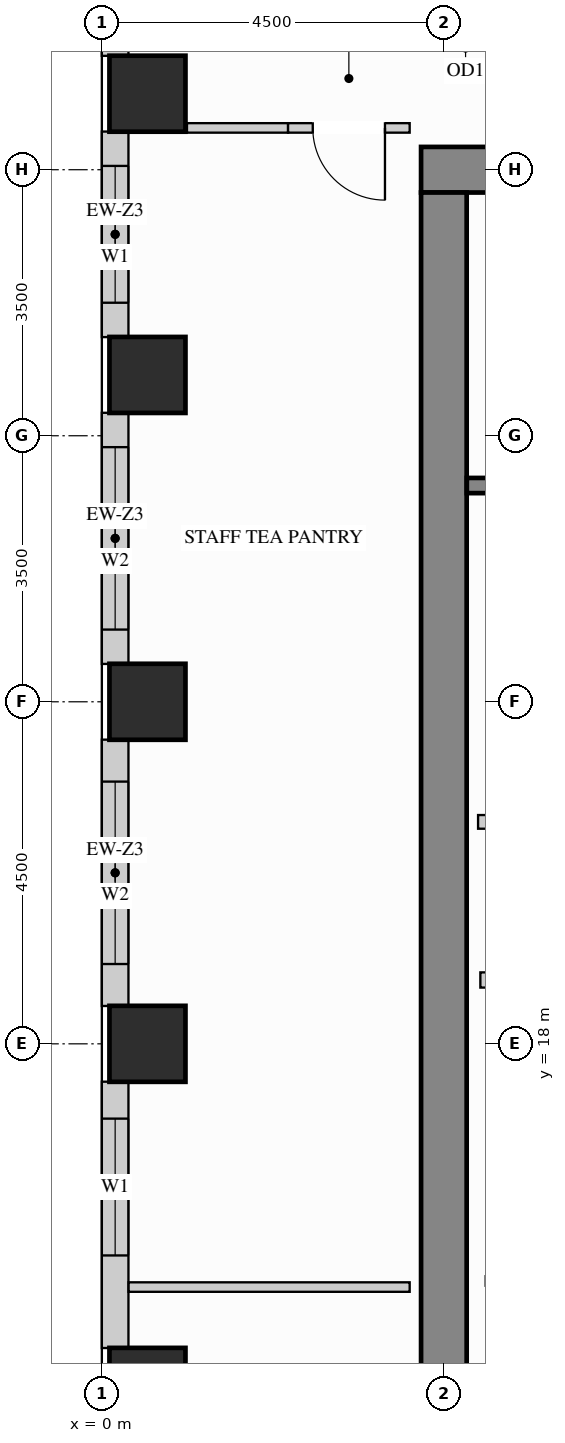
"""IFC4 building model, lengths in metres.
Left out: names, types, materials, properties, quantities, classifications, styles, units other than length and angle.
Written with IfcOpenShell. Run it as: python <this file> out.ifc"""

import sys

from ifc_helpers import new_model, si_unit, direction, frame, frame_2d, origin, origin_2d, place, context, subcontext, project, spatial, rectangle, extrude, source, transform, mapped, element, fill, save


model = new_model("IFC4")
c1 = context("Model", 3, precision=1e-05, world=origin(), true_north=direction((0.0, 1.0)))
c2 = subcontext(c1, "Body", "Model", "MODEL_VIEW")
j1 = project(units=[si_unit("LENGTHUNIT", "METRE"), si_unit("PLANEANGLEUNIT", "RADIAN")], contexts=[c1])
p1 = place(None, origin())
s1 = spatial("IfcSite", under=j1, at=p1, CompositionType="ELEMENT")
p2 = place(p1, origin())
s2 = spatial("IfcBuilding", under=s1, at=p2, CompositionType="ELEMENT")
p3 = place(p2, frame((0.0, 0.0, 200.7)))
s3 = spatial("IfcBuildingStorey", under=s2, at=p3, CompositionType="ELEMENT", Elevation=200.7)
m1 = source(origin(), c2, "Body", "SweptSolid", [
    extrude(rectangle(XDim=1.0, YDim=1.0, at=origin_2d()), origin(), (0.0, 0.0, 1.0), 3.4),
])
for number, where, z_axis, x_axis in (
    (1, (0.6, 13.5, 0.0), (0.0, 0.0, 1.0), (1.0, 0.0, 0.0)),
    (2, (0.6, 18.0, 0.0), (0.0, 0.0, 1.0), (1.0, 0.0, 0.0)),
    (3, (0.6, 22.5, 0.0), (0.0, 0.0, 1.0), (1.0, 0.0, 0.0)),
    (4, (0.6, 26.8, 0.0), (0.0, 0.0, 1.0), (1.0, 0.0, 0.0)),
    (5, (0.6, 30.5, 0.0), (0.0, 0.0, 1.0), (1.0, 0.0, 0.0)),
):
    element("IfcColumn", number, at=place(p3, frame(where, z_axis=z_axis, x_axis=x_axis)), inside=s3, PredefinedType="COLUMN", context=c2, shape_type="MappedRepresentation", body=[
        mapped(m1, transform((0.0, 0.0, 0.0), x_axis=(1.0, 0.0, 0.0), y_axis=(0.0, 1.0, 0.0), z_axis=(0.0, 0.0, 1.0))),
    ])
m2 = source(origin(), c2, "Body", "SweptSolid", [
    extrude(rectangle(XDim=10.6, YDim=0.6, at=frame_2d((5.3, 0.0))), origin(), (0.0, 0.0, 1.0), 3.4),
])
p4 = place(p3, frame((4.2, 29.5, 0.0), z_axis=(0.0, 0.0, 1.0), x_axis=(1.0, 0.0, 0.0)))
e6 = element("IfcWall", 6, at=p4, inside=s3, PredefinedType="SHEAR", context=c2, shape_type="MappedRepresentation", body=[
    mapped(m2, transform((0.0, 0.0, 0.0), x_axis=(1.0, 0.0, 0.0), y_axis=(0.0, 1.0, 0.0), z_axis=(0.0, 0.0, 1.0))),
])
m3 = source(origin(), c2, "Body", "SweptSolid", [
    extrude(rectangle(XDim=20.4, YDim=0.6, at=frame_2d((10.2, 0.0))), origin(), (0.0, 0.0, 1.0), 3.4),
])
p5 = place(p3, frame((4.5, 8.8, 0.0), z_axis=(0.0, 0.0, 1.0), x_axis=(0.0, 1.0, 0.0)))
e7 = element("IfcWall", 7, at=p5, inside=s3, PredefinedType="SHEAR", context=c2, shape_type="MappedRepresentation", body=[
    mapped(m3, transform((0.0, 0.0, 0.0), x_axis=(1.0, 0.0, 0.0), y_axis=(0.0, 1.0, 0.0), z_axis=(0.0, 0.0, 1.0))),
])
p6 = place(p3, frame((0.175, 34.502, 0.0), z_axis=(0.0, 0.0, 1.0), x_axis=(0.0, -1.0, 0.0)))
e8 = element("IfcWall", 8, at=p6, inside=s3, PredefinedType="SOLIDWALL", context=c2, shape_type="SweptSolid", body=[
    extrude(rectangle(XDim=3.504, YDim=0.35, at=frame_2d((1.752, 0.0))), origin(), (0.0, 0.0, 1.0), 2.612),
])
p7 = place(p6, frame((0.511, 0.0, 0.78)))
e9 = element("IfcOpeningElement", 9, at=p7, cuts=e8, PredefinedType="OPENING", context=c2, shape_type="SweptSolid", body=[
    extrude(rectangle(XDim=1.8, YDim=1.652, at=frame_2d((0.9, 0.826))), frame((0.0, 0.185, 0.0), z_axis=(0.0, -1.0, 0.0), x_axis=(1.0, 0.0, 0.0)), (0.0, 0.0, 1.0), 0.37),
])
p8 = place(p3, frame((0.175, 30.002, 0.0), z_axis=(0.0, 0.0, 1.0), x_axis=(0.0, -1.0, 0.0)))
e10 = element("IfcWall", 10, at=p8, inside=s3, PredefinedType="SOLIDWALL", context=c2, shape_type="SweptSolid", body=[
    extrude(rectangle(XDim=2.704, YDim=0.35, at=frame_2d((1.352, 0.0))), origin(), (0.0, 0.0, 1.0), 2.612),
])
p9 = place(p8, frame((0.452, 0.0, 0.78)))
e11 = element("IfcOpeningElement", 11, at=p9, cuts=e10, PredefinedType="OPENING", context=c2, shape_type="SweptSolid", body=[
    extrude(rectangle(XDim=1.8, YDim=1.652, at=frame_2d((0.9, 0.826))), frame((0.0, 0.185, 0.0), z_axis=(0.0, -1.0, 0.0), x_axis=(1.0, 0.0, 0.0)), (0.0, 0.0, 1.0), 0.37),
])
p10 = place(p3, frame((0.175, 26.302, 0.0), z_axis=(0.0, 0.0, 1.0), x_axis=(0.0, -1.0, 0.0)))
e12 = element("IfcWall", 12, at=p10, inside=s3, PredefinedType="SOLIDWALL", context=c2, shape_type="SweptSolid", body=[
    extrude(rectangle(XDim=3.304, YDim=0.35, at=frame_2d((1.652, 0.0))), origin(), (0.0, 0.0, 1.0), 2.612),
])
p11 = place(p10, frame((0.452, 0.0, 0.78)))
e13 = element("IfcOpeningElement", 13, at=p11, cuts=e12, PredefinedType="OPENING", context=c2, shape_type="SweptSolid", body=[
    extrude(rectangle(XDim=2.4, YDim=1.652, at=frame_2d((1.2, 0.826))), frame((0.0, 0.185, 0.0), z_axis=(0.0, -1.0, 0.0), x_axis=(1.0, 0.0, 0.0)), (0.0, 0.0, 1.0), 0.37),
])
p12 = place(p3, frame((0.175, 22.002, 0.0), z_axis=(0.0, 0.0, 1.0), x_axis=(0.0, -1.0, 0.0)))
e14 = element("IfcWall", 14, at=p12, inside=s3, PredefinedType="SOLIDWALL", context=c2, shape_type="SweptSolid", body=[
    extrude(rectangle(XDim=3.504, YDim=0.35, at=frame_2d((1.752, 0.0))), origin(), (0.0, 0.0, 1.0), 2.612),
])
p13 = place(p12, frame((0.552, 0.0, 0.78)))
e15 = element("IfcOpeningElement", 15, at=p13, cuts=e14, PredefinedType="OPENING", context=c2, shape_type="SweptSolid", body=[
    extrude(rectangle(XDim=2.4, YDim=1.652, at=frame_2d((1.2, 0.826))), frame((0.0, 0.185, 0.0), z_axis=(0.0, -1.0, 0.0), x_axis=(1.0, 0.0, 0.0)), (0.0, 0.0, 1.0), 0.37),
])
p14 = place(p3, frame((0.175, 17.502, 0.0), z_axis=(0.0, 0.0, 1.0), x_axis=(0.0, -1.0, 0.0)))
e16 = element("IfcWall", 16, at=p14, inside=s3, PredefinedType="SOLIDWALL", context=c2, shape_type="SweptSolid", body=[
    extrude(rectangle(XDim=3.504, YDim=0.35, at=frame_2d((1.752, 0.0))), origin(), (0.0, 0.0, 1.0), 2.612),
])
p15 = place(p14, frame((0.486, 0.0, 0.78)))
e17 = element("IfcOpeningElement", 17, at=p15, cuts=e16, PredefinedType="OPENING", context=c2, shape_type="SweptSolid", body=[
    extrude(rectangle(XDim=1.8, YDim=1.652, at=frame_2d((0.9, 0.826))), frame((0.0, 0.185, 0.0), z_axis=(0.0, -1.0, 0.0), x_axis=(1.0, 0.0, 0.0)), (0.0, 0.0, 1.0), 0.37),
])
m4 = source(origin(), c2, "Body", "SweptSolid", [
    extrude(rectangle(XDim=2.2, YDim=0.18, at=frame_2d((1.1, 0.0))), origin(), (0.0, 0.0, 1.0), 3.385),
])
p16 = place(p3, frame((4.95, 20.92, 0.0), z_axis=(0.0, 0.0, 1.0), x_axis=(1.0, 0.0, 0.0)))
e18 = element("IfcWall", 18, at=p16, inside=s3, PredefinedType="PARTITIONING", context=c2, shape_type="MappedRepresentation", body=[
    mapped(m4, transform((0.0, 0.0, 0.0), x_axis=(1.0, 0.0, 0.0), y_axis=(0.0, 1.0, 0.0), z_axis=(0.0, 0.0, 1.0))),
])
p17 = place(p3, frame((5.05, 14.88, 0.0), z_axis=(0.0, 0.0, 1.0), x_axis=(1.0, 0.0, 0.0)))
e19 = element("IfcWall", 19, at=p17, inside=s3, PredefinedType="PARTITIONING", context=c2, shape_type="SweptSolid", body=[
    extrude(rectangle(XDim=2.35, YDim=0.125, at=frame_2d((1.175, 0.0))), origin(), (0.0, 0.0, 1.0), 3.385),
])
p18 = place(p17, frame((0.7, 0.0, 0.0)))
e20 = element("IfcOpeningElement", 20, at=p18, cuts=e19, PredefinedType="OPENING", context=c2, shape_type="SweptSolid", body=[
    extrude(rectangle(XDim=0.85, YDim=2.1, at=frame_2d((0.425, 1.05))), frame((0.0, 0.073, 0.0), z_axis=(0.0, -1.0, 0.0), x_axis=(1.0, 0.0, 0.0)), (0.0, 0.0, 1.0), 0.145),
])
m5 = source(origin(), c2, "Body", "SweptSolid", [
    extrude(rectangle(XDim=1.33, YDim=0.125, at=frame_2d((0.665, 0.0))), origin(), (0.0, 0.0, 1.0), 3.385),
])
p19 = place(p3, frame((1.12, 30.05, 0.0), z_axis=(0.0, 0.0, 1.0), x_axis=(1.0, 0.0, 0.0)))
e21 = element("IfcWall", 21, at=p19, inside=s3, PredefinedType="PARTITIONING", context=c2, shape_type="MappedRepresentation", body=[
    mapped(m5, transform((0.0, 0.0, 0.0), x_axis=(1.0, 0.0, 0.0), y_axis=(0.0, 1.0, 0.0), z_axis=(0.0, 0.0, 1.0))),
])
p20 = place(p3, frame((2.45, 30.05, 0.0), z_axis=(0.0, 0.0, 1.0), x_axis=(1.0, 0.0, 0.0)))
e22 = element("IfcWall", 22, at=p20, inside=s3, PredefinedType="PARTITIONING", context=c2, shape_type="SweptSolid", body=[
    extrude(rectangle(XDim=1.6, YDim=0.125, at=frame_2d((0.8, 0.0))), origin(), (0.0, 0.0, 1.0), 3.385),
])
p21 = place(p20, frame((0.325, 0.0, 0.0)))
e23 = element("IfcOpeningElement", 23, at=p21, cuts=e22, PredefinedType="OPENING", context=c2, shape_type="SweptSolid", body=[
    extrude(rectangle(XDim=0.95, YDim=2.15, at=frame_2d((0.475, 1.075))), frame((0.0, 0.073, 0.0), z_axis=(0.0, -1.0, 0.0), x_axis=(1.0, 0.0, 0.0)), (0.0, 0.0, 1.0), 0.145),
])
m6 = source(origin(), c2, "Body", "SweptSolid", [
    extrude(rectangle(XDim=3.698, YDim=0.125, at=frame_2d((1.849, 0.0))), origin(), (0.0, 0.0, 1.0), 3.385),
])
p22 = place(p3, frame((0.352, 14.8, 0.0), z_axis=(0.0, 0.0, 1.0), x_axis=(1.0, 0.0, 0.0)))
e24 = element("IfcWall", 24, at=p22, inside=s3, PredefinedType="PARTITIONING", context=c2, shape_type="MappedRepresentation", body=[
    mapped(m6, transform((0.0, 0.0, 0.0), x_axis=(1.0, 0.0, 0.0), y_axis=(0.0, 1.0, 0.0), z_axis=(0.0, 0.0, 1.0))),
])
m7 = source(origin(), c2, "Body", "SweptSolid", [
    extrude(rectangle(XDim=2.09, YDim=0.2, at=frame_2d((1.045, 0.0))), origin(), (0.0, 0.0, 1.0), 3.385),
])
p23 = place(p3, frame((4.98, 18.84, 0.0), z_axis=(0.0, 0.0, 1.0), x_axis=(1.0, 0.0, 0.0)))
e25 = element("IfcWall", 25, at=p23, inside=s3, PredefinedType="PARTITIONING", context=c2, shape_type="MappedRepresentation", body=[
    mapped(m7, transform((0.0, 0.0, 0.0), x_axis=(1.0, 0.0, 0.0), y_axis=(0.0, 1.0, 0.0), z_axis=(0.0, 0.0, 1.0))),
])
p24 = place(p3, frame((4.802, 25.345, 0.0), z_axis=(0.0, 0.0, 1.0), x_axis=(1.0, 0.0, 0.0)))
e26 = element("IfcWall", 26, at=p24, inside=s3, PredefinedType="SHEAR", context=c2, shape_type="SweptSolid", body=[
    extrude(rectangle(XDim=7.603, YDim=0.2, at=frame_2d((3.802, 0.0))), origin(), (0.0, 0.0, 1.0), 3.4),
])
p25 = place(p24, frame((0.4, 0.0, 0.0)))
e27 = element("IfcOpeningElement", 27, at=p25, cuts=e26, PredefinedType="OPENING", context=c2, shape_type="SweptSolid", body=[
    extrude(rectangle(XDim=1.1, YDim=2.15, at=frame_2d((0.55, 1.075))), frame((0.0, 0.11, 0.0), z_axis=(0.0, -1.0, 0.0), x_axis=(1.0, 0.0, 0.0)), (0.0, 0.0, 1.0), 0.22),
])
m8 = source(origin(), c2, "Body", "SweptSolid", [
    extrude(rectangle(XDim=0.95, YDim=2.15, at=frame_2d((0.475, 1.075))), frame((0.0, 0.025, 0.0), z_axis=(0.0, -1.0, 0.0), x_axis=(1.0, 0.0, 0.0)), (0.0, 0.0, 1.0), 0.05),
])
p26 = place(p21, origin())
e28 = element("IfcDoor", 28, at=p26, inside=s3, OperationType="SINGLE_SWING_RIGHT", PredefinedType="DOOR", context=c2, shape_type="MappedRepresentation", body=[
    mapped(m8, transform((0.0, 0.0, 0.0), x_axis=(1.0, 0.0, 0.0), y_axis=(0.0, 1.0, 0.0), z_axis=(0.0, 0.0, 1.0))),
])
fill(e23, e28)
m9 = source(origin(), c2, "Body", "SweptSolid", [
    extrude(rectangle(XDim=1.8, YDim=1.652, at=frame_2d((0.9, 0.826))), frame((0.0, 0.03, 0.0), z_axis=(0.0, -1.0, 0.0), x_axis=(1.0, 0.0, 0.0)), (0.0, 0.0, 1.0), 0.06),
])
p27 = place(p9, origin())
e29 = element("IfcWindow", 29, at=p27, inside=s3, PartitioningType="SINGLE_PANEL", PredefinedType="WINDOW", context=c2, shape_type="MappedRepresentation", body=[
    mapped(m9, transform((0.0, 0.0, 0.0), x_axis=(1.0, 0.0, 0.0), y_axis=(0.0, 1.0, 0.0), z_axis=(0.0, 0.0, 1.0))),
])
fill(e11, e29)
p28 = place(p15, origin())
e30 = element("IfcWindow", 30, at=p28, inside=s3, PartitioningType="SINGLE_PANEL", PredefinedType="WINDOW", context=c2, shape_type="MappedRepresentation", body=[
    mapped(m9, transform((0.0, 0.0, 0.0), x_axis=(1.0, 0.0, 0.0), y_axis=(0.0, 1.0, 0.0), z_axis=(0.0, 0.0, 1.0))),
])
fill(e17, e30)
m10 = source(origin(), c2, "Body", "SweptSolid", [
    extrude(rectangle(XDim=2.4, YDim=1.652, at=frame_2d((1.2, 0.826))), frame((0.0, 0.03, 0.0), z_axis=(0.0, -1.0, 0.0), x_axis=(1.0, 0.0, 0.0)), (0.0, 0.0, 1.0), 0.06),
])
p29 = place(p11, origin())
e31 = element("IfcWindow", 31, at=p29, inside=s3, PartitioningType="SINGLE_PANEL", PredefinedType="WINDOW", context=c2, shape_type="MappedRepresentation", body=[
    mapped(m10, transform((0.0, 0.0, 0.0), x_axis=(1.0, 0.0, 0.0), y_axis=(0.0, 1.0, 0.0), z_axis=(0.0, 0.0, 1.0))),
])
fill(e13, e31)
p30 = place(p13, origin())
e32 = element("IfcWindow", 32, at=p30, inside=s3, PartitioningType="SINGLE_PANEL", PredefinedType="WINDOW", context=c2, shape_type="MappedRepresentation", body=[
    mapped(m10, transform((0.0, 0.0, 0.0), x_axis=(1.0, 0.0, 0.0), y_axis=(0.0, 1.0, 0.0), z_axis=(0.0, 0.0, 1.0))),
])
fill(e15, e32)
save(model, sys.argv[1])
